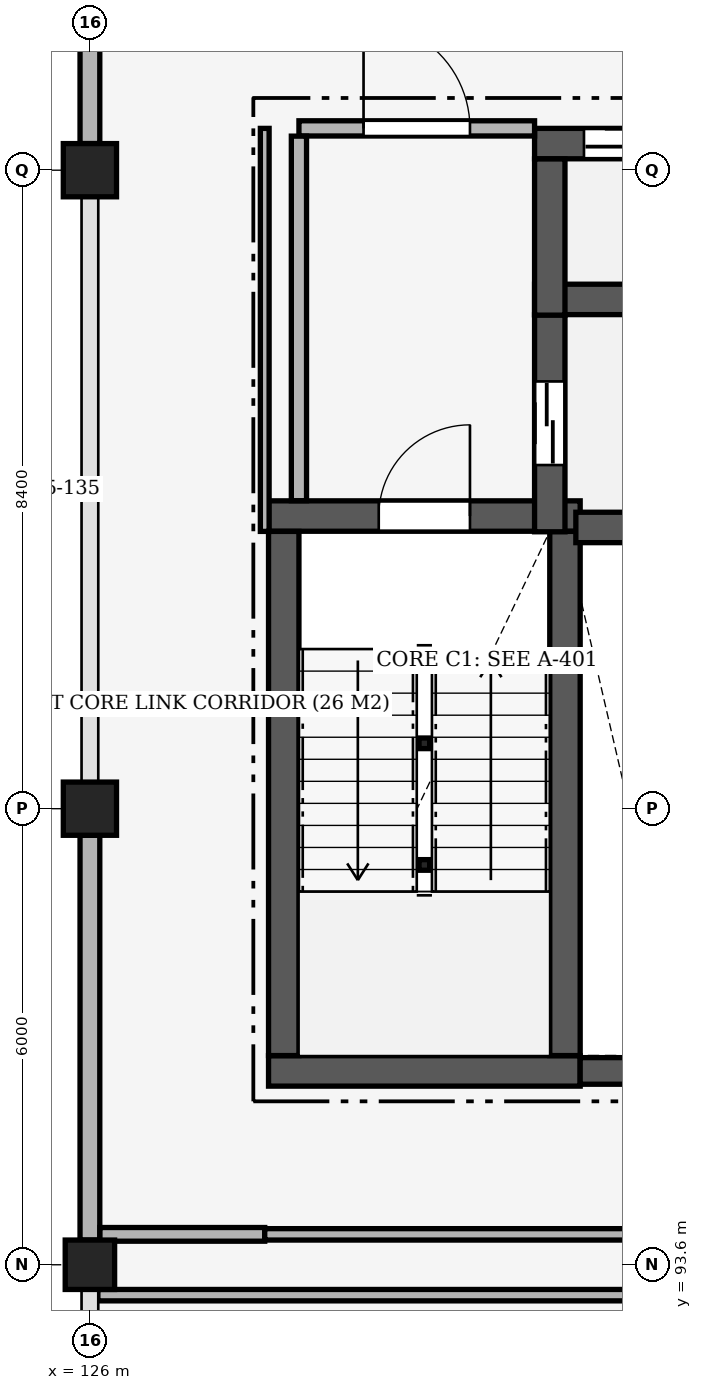
"""IFC4 building model, lengths in metres.
Left out: names, types, materials, properties, quantities, classifications, styles, units other than length and angle.
Written with IfcOpenShell. Run it as: python <this file> out.ifc"""

import sys

from ifc_helpers import new_model, si_unit, direction, frame, frame_2d, origin, origin_2d, place, context, subcontext, project, spatial, rectangle, hollow_circle, extrude, element, fill, save


model = new_model("IFC4")
c1 = context("Model", 3, precision=1e-05, world=origin(), true_north=direction((0.0, 1.0)))
c2 = subcontext(c1, "Body", "Model", "MODEL_VIEW")
j1 = project(units=[si_unit("LENGTHUNIT", "METRE"), si_unit("PLANEANGLEUNIT", "RADIAN")], contexts=[c1])
p1 = place(None, origin())
s1 = spatial("IfcSite", under=j1, at=p1, CompositionType="ELEMENT")
p2 = place(p1, origin())
s2 = spatial("IfcBuilding", under=s1, at=p2, CompositionType="ELEMENT")
p3 = place(p2, frame((0.0, 0.0, 25.2)))
s3 = spatial("IfcBuildingStorey", under=s2, at=p3, CompositionType="ELEMENT", Elevation=25.2)
p4 = place(p3, frame((126.0, 93.6, 0.0), z_axis=(0.0, 0.0, 1.0), x_axis=(1.0, 0.0, 0.0)))
e1 = element("IfcColumn", 1, at=p4, inside=s3, PredefinedType="COLUMN", context=c2, shape_type="SweptSolid", body=[
    extrude(rectangle(XDim=0.65, YDim=0.65, at=origin_2d()), origin(), (0.0, 0.0, 1.0), 4.2),
])
for number, where, z_axis, x_axis in (
    (2, (126.0, 99.6, 0.0), (0.0, 0.0, 1.0), (1.0, 0.0, 0.0)),
    (3, (126.0, 108.0, 0.0), (0.0, 0.0, 1.0), (1.0, 0.0, 0.0)),
):
    element("IfcColumn", number, at=place(p3, frame(where, z_axis=z_axis, x_axis=x_axis)), inside=s3, PredefinedType="COLUMN", context=c2, shape_type="SweptSolid", body=[
        extrude(rectangle(XDim=0.7, YDim=0.7, at=origin_2d()), origin(), (0.0, 0.0, 1.0), 4.2),
    ])
for number, where, z_axis, x_axis in (
    (4, (130.4, 98.86, -2.83), (0.0, 0.0, 1.0), (1.0, 0.0, 0.0)),
    (5, (130.4, 100.46, -2.83), (0.0, 0.0, 1.0), (1.0, 0.0, 0.0)),
):
    element("IfcColumn", number, at=place(p3, frame(where, z_axis=z_axis, x_axis=x_axis)), inside=s3, PredefinedType="COLUMN", context=c2, shape_type="SweptSolid", body=[
        extrude(hollow_circle(Radius=0.07, WallThickness=0.008, at=origin_2d()), origin(), (0.0, 0.0, 1.0), 4.5),
    ])
p5 = place(p3, frame((126.0, 93.925, 0.0), z_axis=(0.0, 0.0, 1.0), x_axis=(0.0, 1.0, 0.0)))
e6 = element("IfcWall", 6, at=p5, inside=s3, PredefinedType="SOLIDWALL", context=c2, shape_type="SweptSolid", body=[
    extrude(rectangle(XDim=5.325, YDim=0.26, at=frame_2d((2.663, 0.0))), origin(), (0.0, 0.0, 1.0), 3.4),
])
p6 = place(p3, frame((126.0, 108.35, 0.0), z_axis=(0.0, 0.0, 1.0), x_axis=(0.0, 1.0, 0.0)))
e7 = element("IfcWall", 7, at=p6, inside=s3, PredefinedType="SOLIDWALL", context=c2, shape_type="SweptSolid", body=[
    extrude(rectangle(XDim=4.7, YDim=0.26, at=frame_2d((2.35, 0.0))), origin(), (0.0, 0.0, 1.0), 3.4),
])
p7 = place(p6, frame((1.55, 0.0, 1.05)))
e8 = element("IfcOpeningElement", 8, at=p7, cuts=e7, PredefinedType="OPENING", context=c2, shape_type="SweptSolid", body=[
    extrude(rectangle(XDim=1.6, YDim=1.8, at=frame_2d((0.8, 0.9))), frame((0.0, 0.145, 0.0), z_axis=(0.0, -1.0, 0.0), x_axis=(1.0, 0.0, 0.0)), (0.0, 0.0, 1.0), 0.29),
])
p8 = place(p3, frame((128.35, 103.45, 0.0), z_axis=(0.0, 0.0, 1.0), x_axis=(1.0, 0.0, 0.0)))
e9 = element("IfcWall", 9, at=p8, inside=s3, PredefinedType="SHEAR", context=c2, shape_type="SweptSolid", body=[
    extrude(rectangle(XDim=4.1, YDim=0.4, at=frame_2d((2.05, 0.0))), origin(), (0.0, 0.0, 1.0), 3.95),
])
p9 = place(p8, frame((1.45, 0.0, 0.0)))
e10 = element("IfcOpeningElement", 10, at=p9, cuts=e9, PredefinedType="OPENING", context=c2, shape_type="SweptSolid", body=[
    extrude(rectangle(XDim=1.2, YDim=2.2, at=frame_2d((0.6, 1.1))), frame((0.0, 0.215, 0.0), z_axis=(0.0, -1.0, 0.0), x_axis=(1.0, 0.0, 0.0)), (0.0, 0.0, 1.0), 0.43),
])
p10 = place(p3, frame((128.35, 96.15, 0.0), z_axis=(0.0, 0.0, 1.0), x_axis=(1.0, 0.0, 0.0)))
e11 = element("IfcWall", 11, at=p10, inside=s3, PredefinedType="SHEAR", context=c2, shape_type="SweptSolid", body=[
    extrude(rectangle(XDim=4.1, YDim=0.4, at=frame_2d((2.05, 0.0))), origin(), (0.0, 0.0, 1.0), 3.95),
])
for number, where, z_axis, x_axis in (
    (12, (128.55, 96.352, 0.0), (0.0, 0.0, 1.0), (0.0, 1.0, 0.0)),
    (13, (132.25, 96.352, 0.0), (0.0, 0.0, 1.0), (0.0, 1.0, 0.0)),
):
    element("IfcWall", number, at=place(p3, frame(where, z_axis=z_axis, x_axis=x_axis)), inside=s3, PredefinedType="SHEAR", context=c2, shape_type="SweptSolid", body=[
        extrude(rectangle(XDim=6.896, YDim=0.4, at=frame_2d((3.448, 0.0))), origin(), (0.0, 0.0, 1.0), 3.95),
    ])
p11 = place(p3, frame((132.393, 103.3, 0.0), z_axis=(0.0, 0.0, 1.0), x_axis=(1.0, 0.0, 0.0)))
e14 = element("IfcWall", 14, at=p11, inside=s3, PredefinedType="SHEAR", context=c2, shape_type="SweptSolid", body=[
    extrude(rectangle(XDim=1.857, YDim=0.4, at=frame_2d((0.928, 0.0))), origin(), (0.0, 0.0, 1.0), 3.95),
])
p12 = place(p3, frame((131.85, 106.3, 0.0), z_axis=(0.0, 0.0, 1.0), x_axis=(1.0, 0.0, 0.0)))
e15 = element("IfcWall", 15, at=p12, inside=s3, PredefinedType="SHEAR", context=c2, shape_type="SweptSolid", body=[
    extrude(rectangle(XDim=2.4, YDim=0.4, at=frame_2d((1.2, 0.0))), origin(), (0.0, 0.0, 1.0), 3.95),
])
p13 = place(p3, frame((132.05, 103.243, 0.0), z_axis=(0.0, 0.0, 1.0), x_axis=(0.0, 1.0, 0.0)))
e16 = element("IfcWall", 16, at=p13, inside=s3, PredefinedType="SHEAR", context=c2, shape_type="SweptSolid", body=[
    extrude(rectangle(XDim=2.855, YDim=0.4, at=frame_2d((1.427, 0.0))), origin(), (0.0, 0.0, 1.0), 3.95),
])
p14 = place(p13, frame((0.878, 0.0, 0.0)))
e17 = element("IfcOpeningElement", 17, at=p14, cuts=e16, PredefinedType="OPENING", context=c2, shape_type="SweptSolid", body=[
    extrude(rectangle(XDim=1.1, YDim=2.15, at=frame_2d((0.55, 1.075))), frame((0.0, 0.215, 0.0), z_axis=(0.0, -1.0, 0.0), x_axis=(1.0, 0.0, 0.0)), (0.0, 0.0, 1.0), 0.43),
])
p15 = place(p3, frame((131.85, 108.35, 0.0), z_axis=(0.0, 0.0, 1.0), x_axis=(1.0, 0.0, 0.0)))
e18 = element("IfcWall", 18, at=p15, inside=s3, PredefinedType="SHEAR", context=c2, shape_type="SweptSolid", body=[
    extrude(rectangle(XDim=2.4, YDim=0.4, at=frame_2d((1.2, 0.0))), origin(), (0.0, 0.0, 1.0), 3.95),
])
p16 = place(p15, frame((0.65, 0.0, 0.0)))
e19 = element("IfcOpeningElement", 19, at=p16, cuts=e18, PredefinedType="OPENING", context=c2, shape_type="SweptSolid", body=[
    extrude(rectangle(XDim=1.1, YDim=2.15, at=frame_2d((0.55, 1.075))), frame((0.0, 0.215, 0.0), z_axis=(0.0, -1.0, 0.0), x_axis=(1.0, 0.0, 0.0)), (0.0, 0.0, 1.0), 0.43),
])
p17 = place(p3, frame((132.05, 106.093, 0.0), z_axis=(0.0, 0.0, 1.0), x_axis=(0.0, 1.0, 0.0)))
e20 = element("IfcWall", 20, at=p17, inside=s3, PredefinedType="SHEAR", context=c2, shape_type="SweptSolid", body=[
    extrude(rectangle(XDim=2.055, YDim=0.4, at=frame_2d((1.027, 0.0))), origin(), (0.0, 0.0, 1.0), 3.95),
])
p18 = place(p3, frame((132.45, 96.15, 0.0), z_axis=(0.0, 0.0, 1.0), x_axis=(1.0, 0.0, 0.0)))
e21 = element("IfcWall", 21, at=p18, inside=s3, PredefinedType="SHEAR", context=c2, shape_type="SweptSolid", body=[
    extrude(rectangle(XDim=1.8, YDim=0.35, at=frame_2d((0.9, 0.0))), origin(), (0.0, 0.0, 1.0), 3.95),
])
p19 = place(p3, frame((126.105, 93.2, 0.0), z_axis=(0.0, 0.0, 1.0), x_axis=(1.0, 0.0, 0.0)))
e22 = element("IfcWall", 22, at=p19, inside=s3, PredefinedType="PARTITIONING", context=c2, shape_type="SweptSolid", body=[
    extrude(rectangle(XDim=12.695, YDim=0.15, at=frame_2d((6.348, 0.0))), origin(), (0.0, 0.0, 1.0), 3.25),
])
p20 = place(p3, frame((126.132, 94.0, 0.0), z_axis=(0.0, 0.0, 1.0), x_axis=(1.0, 0.0, 0.0)))
e23 = element("IfcWall", 23, at=p20, inside=s3, PredefinedType="PARTITIONING", context=c2, shape_type="SweptSolid", body=[
    extrude(rectangle(XDim=2.168, YDim=0.18, at=frame_2d((1.084, 0.0))), origin(), (0.0, 0.0, 1.0), 3.4),
])
p21 = place(p3, frame((128.3, 94.0, 0.0), z_axis=(0.0, 0.0, 1.0), x_axis=(1.0, 0.0, 0.0)))
e24 = element("IfcWall", 24, at=p21, inside=s3, PredefinedType="PARTITIONING", context=c2, shape_type="SweptSolid", body=[
    extrude(rectangle(XDim=10.5, YDim=0.15, at=frame_2d((5.25, 0.0))), origin(), (0.0, 0.0, 1.0), 3.4),
])
p22 = place(p3, frame((128.75, 108.55, 0.0), z_axis=(0.0, 0.0, 1.0), x_axis=(1.0, 0.0, 0.0)))
e25 = element("IfcWall", 25, at=p22, inside=s3, PredefinedType="PARTITIONING", context=c2, shape_type="SweptSolid", body=[
    extrude(rectangle(XDim=3.1, YDim=0.2, at=frame_2d((1.55, 0.0))), origin(), (0.0, 0.0, 1.0), 3.95),
])
p23 = place(p22, frame((0.85, 0.0, 0.0)))
e26 = element("IfcOpeningElement", 26, at=p23, cuts=e25, PredefinedType="OPENING", context=c2, shape_type="SweptSolid", body=[
    extrude(rectangle(XDim=1.4, YDim=2.2, at=frame_2d((0.7, 1.1))), frame((0.0, 0.115, 0.0), z_axis=(0.0, -1.0, 0.0), x_axis=(1.0, 0.0, 0.0)), (0.0, 0.0, 1.0), 0.23),
])
p24 = place(p3, frame((128.3, 103.248, 0.0), z_axis=(0.0, 0.0, 1.0), x_axis=(0.0, 1.0, 0.0)))
e27 = element("IfcWall", 27, at=p24, inside=s3, PredefinedType="PARTITIONING", context=c2, shape_type="SweptSolid", body=[
    extrude(rectangle(XDim=5.302, YDim=0.115, at=frame_2d((2.651, 0.0))), origin(), (0.0, 0.0, 1.0), 3.95),
])
p25 = place(p3, frame((128.75, 103.652, 0.0), z_axis=(0.0, 0.0, 1.0), x_axis=(0.0, 1.0, 0.0)))
e28 = element("IfcWall", 28, at=p25, inside=s3, PredefinedType="PARTITIONING", context=c2, shape_type="SweptSolid", body=[
    extrude(rectangle(XDim=4.796, YDim=0.2, at=frame_2d((2.398, 0.0))), origin(), (0.0, 0.0, 1.0), 3.95),
])
p26 = place(p9, origin())
e29 = element("IfcDoor", 29, at=p26, inside=s3, OperationType="SINGLE_SWING_RIGHT", PredefinedType="DOOR", context=c2, shape_type="SweptSolid", body=[
    extrude(rectangle(XDim=1.2, YDim=2.2, at=frame_2d((0.6, 1.1))), frame((0.0, 0.025, 0.0), z_axis=(0.0, -1.0, 0.0), x_axis=(1.0, 0.0, 0.0)), (0.0, 0.0, 1.0), 0.05),
])
fill(e10, e29)
p27 = place(p14, origin())
e30 = element("IfcDoor", 30, at=p27, inside=s3, OperationType="DOUBLE_DOOR_SLIDING", PredefinedType="DOOR", context=c2, shape_type="SweptSolid", body=[
    extrude(rectangle(XDim=1.1, YDim=2.15, at=frame_2d((0.55, 1.075))), frame((0.0, 0.025, 0.0), z_axis=(0.0, -1.0, 0.0), x_axis=(1.0, 0.0, 0.0)), (0.0, 0.0, 1.0), 0.05),
])
fill(e17, e30)
p28 = place(p16, origin())
e31 = element("IfcDoor", 31, at=p28, inside=s3, OperationType="DOUBLE_DOOR_SLIDING", PredefinedType="DOOR", context=c2, shape_type="SweptSolid", body=[
    extrude(rectangle(XDim=1.1, YDim=2.15, at=frame_2d((0.55, 1.075))), frame((0.0, 0.025, 0.0), z_axis=(0.0, -1.0, 0.0), x_axis=(1.0, 0.0, 0.0)), (0.0, 0.0, 1.0), 0.05),
])
fill(e19, e31)
p29 = place(p23, origin())
e32 = element("IfcDoor", 32, at=p29, inside=s3, OperationType="SINGLE_SWING_LEFT", PredefinedType="DOOR", context=c2, shape_type="SweptSolid", body=[
    extrude(rectangle(XDim=1.4, YDim=2.2, at=frame_2d((0.7, 1.1))), frame((0.0, 0.025, 0.0), z_axis=(0.0, -1.0, 0.0), x_axis=(1.0, 0.0, 0.0)), (0.0, 0.0, 1.0), 0.05),
])
fill(e26, e32)
save(model, sys.argv[1])
